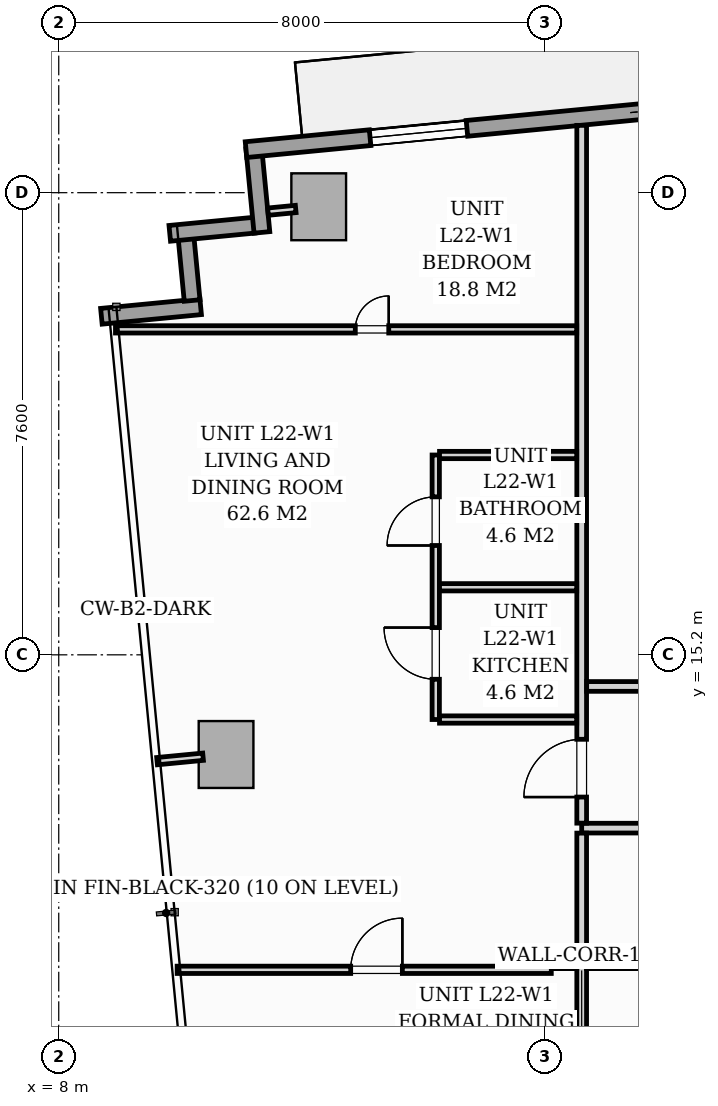
"""IFC4 building model, lengths in metres.
Left out: names, types, materials, properties, quantities, classifications, styles, units other than length and angle.
Written with IfcOpenShell. Run it as: python <this file> out.ifc"""

import sys

from ifc_helpers import new_model, si_unit, direction, frame, frame_2d, origin, origin_2d, place, context, subcontext, project, spatial, rectangle, extrude, source, transform, mapped, element, fill, save


model = new_model("IFC4")
c1 = context("Model", 3, precision=1e-05, world=origin(), true_north=direction((0.0, 1.0)))
c2 = subcontext(c1, "Body", "Model", "MODEL_VIEW")
j1 = project(units=[si_unit("LENGTHUNIT", "METRE"), si_unit("PLANEANGLEUNIT", "RADIAN")], contexts=[c1])
p1 = place(None, origin())
s1 = spatial("IfcSite", under=j1, at=p1, CompositionType="ELEMENT")
p2 = place(p1, origin())
s2 = spatial("IfcBuilding", under=s1, at=p2, CompositionType="ELEMENT")
p3 = place(p2, frame((0.0, 0.0, 81.0)))
s3 = spatial("IfcBuildingStorey", under=s2, at=p3, CompositionType="ELEMENT", Elevation=81.0)
m1 = source(origin(), c2, "Body", "SweptSolid", [
    extrude(rectangle(XDim=0.9, YDim=1.1, at=origin_2d()), origin(), (0.0, 0.0, 1.0), 3.196),
])
for number, where, z_axis, x_axis in (
    (1, (12.275, 22.568, 0.002), (0.0, 0.0, 1.0), (0.995, 0.096, 0.0)),
    (2, (10.752, 13.561, 0.002), (0.0, 0.0, 1.0), (0.995, 0.096, 0.0)),
):
    element("IfcColumn", number, at=place(p3, frame(where, z_axis=z_axis, x_axis=x_axis)), inside=s3, PredefinedType="COLUMN", context=c2, shape_type="MappedRepresentation", body=[
        mapped(m1, transform((0.0, 0.0, 0.0), scale=1.0)),
    ])
p4 = place(p3, frame((8.701, 20.767, 0.0), z_axis=(0.0, 0.0, 1.0), x_axis=(0.995394563142, 0.095862733462, 0.0)))
e3 = element("IfcWall", 3, at=p4, inside=s3, PredefinedType="STANDARD", context=c2, shape_type="SweptSolid", body=[
    extrude(rectangle(XDim=1.64, YDim=0.26, at=frame_2d((0.82, 0.0))), origin(), (0.0, 0.0, 1.0), 2.94),
])
p5 = place(p3, frame((10.193, 21.027, 0.0), z_axis=(0.0, 0.0, 1.0), x_axis=(-0.095740721699, 0.995406306092, 0.0)))
e4 = element("IfcWall", 4, at=p5, inside=s3, PredefinedType="STANDARD", context=c2, shape_type="SweptSolid", body=[
    extrude(rectangle(XDim=1.15, YDim=0.26, at=frame_2d((0.575, 0.0))), origin(), (0.0, 0.0, 1.0), 2.94),
])
p6 = place(p3, frame((9.826, 22.131, 0.0), z_axis=(0.0, 0.0, 1.0), x_axis=(0.995389446633, 0.095915846097, 0.0)))
e5 = element("IfcWall", 5, at=p6, inside=s3, PredefinedType="STANDARD", context=c2, shape_type="SweptSolid", body=[
    extrude(rectangle(XDim=1.395, YDim=0.26, at=frame_2d((0.697, 0.0))), origin(), (0.0, 0.0, 1.0), 2.94),
])
p7 = place(p3, frame((11.341, 22.147, 0.0), z_axis=(0.0, 0.0, 1.0), x_axis=(-0.09589913835, 0.995391056452, 0.0)))
e6 = element("IfcWall", 6, at=p7, inside=s3, PredefinedType="STANDARD", context=c2, shape_type="SweptSolid", body=[
    extrude(rectangle(XDim=1.395, YDim=0.26, at=frame_2d((0.698, 0.0))), origin(), (0.0, 0.0, 1.0), 2.94),
])
p8 = place(p3, frame((11.08, 23.508, 0.0), z_axis=(0.0, 0.0, 1.0), x_axis=(0.995396638587, 0.095841180552, 0.0)))
e7 = element("IfcWall", 7, at=p8, inside=s3, PredefinedType="STANDARD", context=c2, shape_type="SweptSolid", body=[
    extrude(rectangle(XDim=19.11, YDim=0.26, at=frame_2d((9.555, 0.0))), origin(), (0.0, 0.0, 1.0), 2.94),
])
p9 = place(p8, frame((7.159, 0.0, 0.0)))
e8 = element("IfcOpeningElement", 8, at=p9, cuts=e7, PredefinedType="OPENING", context=c2, shape_type="SweptSolid", body=[
    extrude(rectangle(XDim=1.8, YDim=2.06, at=frame_2d((0.9, 1.03))), frame((0.0, 0.14, 0.0), z_axis=(0.0, -1.0, 0.0), x_axis=(1.0, 0.0, 0.0)), (0.0, 0.0, 1.0), 0.28),
])
p10 = place(p8, frame((2.05, 0.0, 0.65)))
e9 = element("IfcOpeningElement", 9, at=p10, cuts=e7, PredefinedType="OPENING", context=c2, shape_type="SweptSolid", body=[
    extrude(rectangle(XDim=1.6, YDim=1.5, at=frame_2d((0.8, 0.75))), frame((0.0, 0.14, 0.0), z_axis=(0.0, -1.0, 0.0), x_axis=(1.0, 0.0, 0.0)), (0.0, 0.0, 1.0), 0.28),
])
p11 = place(p3, frame((16.6, 12.35, 0.0), z_axis=(0.0, 0.0, 1.0), x_axis=(1.0, 0.0, 0.0)))
e10 = element("IfcWall", 10, at=p11, inside=s3, PredefinedType="PARTITIONING", context=c2, shape_type="SweptSolid", body=[
    extrude(rectangle(XDim=37.6, YDim=0.16, at=frame_2d((18.8, 0.0))), origin(), (0.0, 0.0, 1.0), 2.94),
])
p12 = place(p11, frame((2.091, 0.0, 0.0)))
e11 = element("IfcOpeningElement", 11, at=p12, cuts=e10, PredefinedType="OPENING", context=c2, shape_type="SweptSolid", body=[
    extrude(rectangle(XDim=0.95, YDim=2.06, at=frame_2d((0.475, 1.03))), frame((0.0, 0.09, 0.0), z_axis=(0.0, -1.0, 0.0), x_axis=(1.0, 0.0, 0.0)), (0.0, 0.0, 1.0), 0.18),
])
p13 = place(p11, frame((26.146, 0.0, 0.0)))
e12 = element("IfcOpeningElement", 12, at=p13, cuts=e10, PredefinedType="OPENING", context=c2, shape_type="SweptSolid", body=[
    extrude(rectangle(XDim=0.95, YDim=2.06, at=frame_2d((0.475, 1.03))), frame((0.0, 0.09, 0.0), z_axis=(0.0, -1.0, 0.0), x_axis=(1.0, 0.0, 0.0)), (0.0, 0.0, 1.0), 0.18),
])
p14 = place(p3, frame((16.6, 4.341, 0.0), z_axis=(0.0, 0.0, 1.0), x_axis=(0.0, 1.0, 0.0)))
e13 = element("IfcWall", 13, at=p14, inside=s3, PredefinedType="PARTITIONING", context=c2, shape_type="SweptSolid", body=[
    extrude(rectangle(XDim=7.927, YDim=0.16, at=frame_2d((3.964, 0.0))), origin(), (0.0, 0.0, 1.0), 2.94),
])
p15 = place(p3, frame((16.6, 12.432, 0.0), z_axis=(0.0, 0.0, 1.0), x_axis=(0.0, 1.0, 0.0)))
e14 = element("IfcWall", 14, at=p15, inside=s3, PredefinedType="PARTITIONING", context=c2, shape_type="SweptSolid", body=[
    extrude(rectangle(XDim=11.475, YDim=0.16, at=frame_2d((5.738, 0.0))), origin(), (0.0, 0.0, 1.0), 2.94),
])
p16 = place(p15, frame((0.429, 0.0, 0.0)))
e15 = element("IfcOpeningElement", 15, at=p16, cuts=e14, PredefinedType="OPENING", context=c2, shape_type="SweptSolid", body=[
    extrude(rectangle(XDim=0.95, YDim=2.06, at=frame_2d((0.475, 1.03))), frame((0.0, 0.09, 0.0), z_axis=(0.0, -1.0, 0.0), x_axis=(1.0, 0.0, 0.0)), (0.0, 0.0, 1.0), 0.18),
])
p17 = place(p3, frame((16.1, 10.1, 0.0), z_axis=(0.0, 0.0, 1.0), x_axis=(1.0, 0.0, 0.0)))
e16 = element("IfcWall", 16, at=p17, inside=s3, PredefinedType="PARTITIONING", context=c2, shape_type="SweptSolid", body=[
    extrude(rectangle(XDim=0.418, YDim=0.12, at=frame_2d((0.209, 0.0))), origin(), (0.0, 0.0, 1.0), 2.94),
])
p18 = place(p3, frame((16.682, 10.1, 0.0), z_axis=(0.0, 0.0, 1.0), x_axis=(1.0, 0.0, 0.0)))
e17 = element("IfcWall", 17, at=p18, inside=s3, PredefinedType="PARTITIONING", context=c2, shape_type="SweptSolid", body=[
    extrude(rectangle(XDim=2.123, YDim=0.12, at=frame_2d((1.062, 0.0))), origin(), (0.0, 0.0, 1.0), 2.94),
])
p19 = place(p3, frame((14.2, 14.136, 0.0), z_axis=(0.0, 0.0, 1.0), x_axis=(0.0, 1.0, 0.0)))
e18 = element("IfcWall", 18, at=p19, inside=s3, PredefinedType="PARTITIONING", context=c2, shape_type="SweptSolid", body=[
    extrude(rectangle(XDim=4.35, YDim=0.12, at=frame_2d((2.175, 0.0))), origin(), (0.0, 0.0, 1.0), 2.94),
])
p20 = place(p19, frame((0.662, 0.0, 0.0)))
e19 = element("IfcOpeningElement", 19, at=p20, cuts=e18, PredefinedType="OPENING", context=c2, shape_type="SweptSolid", body=[
    extrude(rectangle(XDim=0.85, YDim=2.05, at=frame_2d((0.425, 1.025))), frame((0.0, 0.07, 0.0), z_axis=(0.0, -1.0, 0.0), x_axis=(1.0, 0.0, 0.0)), (0.0, 0.0, 1.0), 0.14),
])
p21 = place(p19, frame((2.862, 0.0, 0.0)))
e20 = element("IfcOpeningElement", 20, at=p21, cuts=e18, PredefinedType="OPENING", context=c2, shape_type="SweptSolid", body=[
    extrude(rectangle(XDim=0.8, YDim=2.02, at=frame_2d((0.4, 1.01))), frame((0.0, 0.07, 0.0), z_axis=(0.0, -1.0, 0.0), x_axis=(1.0, 0.0, 0.0)), (0.0, 0.0, 1.0), 0.14),
])
for number, where, z_axis, x_axis in (
    (21, (14.262, 16.311, 0.0), (0.0, 0.0, 1.0), (1.0, 0.0, 0.0)),
    (22, (14.262, 14.136, 0.0), (0.0, 0.0, 1.0), (1.0, 0.0, 0.0)),
    (23, (14.262, 18.486, 0.0), (0.0, 0.0, 1.0), (1.0, 0.0, 0.0)),
):
    element("IfcWall", number, at=place(p3, frame(where, z_axis=z_axis, x_axis=x_axis)), inside=s3, PredefinedType="PARTITIONING", context=c2, shape_type="SweptSolid", body=[
        extrude(rectangle(XDim=2.256, YDim=0.12, at=frame_2d((1.128, 0.0))), origin(), (0.0, 0.0, 1.0), 2.94),
    ])
p22 = place(p3, frame((8.933, 20.552, 0.0), z_axis=(0.0, 0.0, 1.0), x_axis=(1.0, 0.0, 0.0)))
e24 = element("IfcWall", 24, at=p22, inside=s3, PredefinedType="PARTITIONING", context=c2, shape_type="SweptSolid", body=[
    extrude(rectangle(XDim=7.585, YDim=0.12, at=frame_2d((3.792, 0.0))), origin(), (0.0, 0.0, 1.0), 2.94),
])
p23 = place(p22, frame((3.944, 0.0, 0.0)))
e25 = element("IfcOpeningElement", 25, at=p23, cuts=e24, PredefinedType="OPENING", context=c2, shape_type="SweptSolid", body=[
    extrude(rectangle(XDim=0.55, YDim=2.0, at=frame_2d((0.275, 1.0))), frame((0.0, 0.07, 0.0), z_axis=(0.0, -1.0, 0.0), x_axis=(1.0, 0.0, 0.0)), (0.0, 0.0, 1.0), 0.14),
])
p24 = place(p3, frame((9.947, 10.02, 0.0), z_axis=(0.0, 0.0, 1.0), x_axis=(1.0, 0.0, 0.0)))
e26 = element("IfcWall", 26, at=p24, inside=s3, PredefinedType="PARTITIONING", context=c2, shape_type="SweptSolid", body=[
    extrude(rectangle(XDim=6.153, YDim=0.12, at=frame_2d((3.076, 0.0))), origin(), (0.0, 0.0, 1.0), 2.94),
])
p25 = place(p24, frame((2.854, 0.0, 0.0)))
e27 = element("IfcOpeningElement", 27, at=p25, cuts=e26, PredefinedType="OPENING", context=c2, shape_type="SweptSolid", body=[
    extrude(rectangle(XDim=0.85, YDim=2.05, at=frame_2d((0.425, 1.025))), frame((0.0, 0.07, 0.0), z_axis=(0.0, -1.0, 0.0), x_axis=(1.0, 0.0, 0.0)), (0.0, 0.0, 1.0), 0.14),
])
p26 = place(p3, frame((16.682, 14.68, 0.0), z_axis=(0.0, 0.0, 1.0), x_axis=(1.0, 0.0, 0.0)))
e28 = element("IfcWall", 28, at=p26, inside=s3, PredefinedType="PARTITIONING", context=c2, shape_type="SweptSolid", body=[
    extrude(rectangle(XDim=9.478, YDim=0.16, at=frame_2d((4.739, 0.0))), origin(), (0.0, 0.0, 1.0), 2.94),
])
p27 = place(p26, frame((4.163, 0.0, 0.0)))
e29 = element("IfcOpeningElement", 29, at=p27, cuts=e28, PredefinedType="OPENING", context=c2, shape_type="SweptSolid", body=[
    extrude(rectangle(XDim=0.95, YDim=2.06, at=frame_2d((0.475, 1.03))), frame((0.0, 0.09, 0.0), z_axis=(0.0, -1.0, 0.0), x_axis=(1.0, 0.0, 0.0)), (0.0, 0.0, 1.0), 0.18),
])
p28 = place(p3, frame((11.897, 22.532, 0.0), z_axis=(0.0, 0.0, 1.0), x_axis=(-0.995384576284, -0.09596637586, 0.0)))
e30 = element("IfcWall", 30, at=p28, inside=s3, PredefinedType="PARTITIONING", context=c2, shape_type="SweptSolid", body=[
    extrude(rectangle(XDim=0.458, YDim=0.12, at=frame_2d((0.229, 0.0))), origin(), (0.0, 0.0, 1.0), 2.94),
])
p29 = place(p3, frame((10.373, 13.524, 0.0), z_axis=(0.0, 0.0, 1.0), x_axis=(-0.995377786728, -0.096036772582, 0.0)))
e31 = element("IfcWall", 31, at=p29, inside=s3, PredefinedType="PARTITIONING", context=c2, shape_type="SweptSolid", body=[
    extrude(rectangle(XDim=0.76, YDim=0.12, at=frame_2d((0.38, 0.0))), origin(), (0.0, 0.0, 1.0), 2.94),
])
m2 = source(origin(), c2, "Body", "SweptSolid", [
    extrude(rectangle(XDim=1.6, YDim=1.5, at=frame_2d((0.8, 0.75))), frame((0.0, 0.03, 0.0), z_axis=(0.0, -1.0, 0.0), x_axis=(1.0, 0.0, 0.0)), (0.0, 0.0, 1.0), 0.06),
])
p30 = place(p10, origin())
e32 = element("IfcWindow", 32, at=p30, inside=s3, PartitioningType="SINGLE_PANEL", PredefinedType="WINDOW", context=c2, shape_type="MappedRepresentation", body=[
    mapped(m2, transform((0.0, 0.0, 0.0), scale=1.0)),
])
fill(e9, e32)
m3 = source(origin(), c2, "Body", "SweptSolid", [
    extrude(rectangle(XDim=0.95, YDim=2.06, at=frame_2d((0.475, 1.03))), frame((0.0, 0.025, 0.0), z_axis=(0.0, -1.0, 0.0), x_axis=(1.0, 0.0, 0.0)), (0.0, 0.0, 1.0), 0.05),
])
p31 = place(p16, origin())
e33 = element("IfcDoor", 33, at=p31, inside=s3, OperationType="SINGLE_SWING_LEFT", PredefinedType="DOOR", context=c2, shape_type="MappedRepresentation", body=[
    mapped(m3, transform((0.0, 0.0, 0.0), scale=1.0)),
])
fill(e15, e33)
m4 = source(origin(), c2, "Body", "SweptSolid", [
    extrude(rectangle(XDim=0.85, YDim=2.05, at=frame_2d((0.425, 1.025))), frame((0.0, 0.025, 0.0), z_axis=(0.0, -1.0, 0.0), x_axis=(1.0, 0.0, 0.0)), (0.0, 0.0, 1.0), 0.05),
])
p32 = place(p20, origin())
e34 = element("IfcDoor", 34, at=p32, inside=s3, OperationType="SINGLE_SWING_RIGHT", PredefinedType="DOOR", context=c2, shape_type="MappedRepresentation", body=[
    mapped(m4, transform((0.0, 0.0, 0.0), scale=1.0)),
])
fill(e19, e34)
m5 = source(origin(), c2, "Body", "SweptSolid", [
    extrude(rectangle(XDim=0.8, YDim=2.02, at=frame_2d((0.4, 1.01))), frame((0.0, 0.025, 0.0), z_axis=(0.0, -1.0, 0.0), x_axis=(1.0, 0.0, 0.0)), (0.0, 0.0, 1.0), 0.05),
])
p33 = place(p21, origin())
e35 = element("IfcDoor", 35, at=p33, inside=s3, OperationType="SINGLE_SWING_LEFT", PredefinedType="DOOR", context=c2, shape_type="MappedRepresentation", body=[
    mapped(m5, transform((0.0, 0.0, 0.0), scale=1.0)),
])
fill(e20, e35)
m6 = source(origin(), c2, "Body", "SweptSolid", [
    extrude(rectangle(XDim=0.55, YDim=2.0, at=frame_2d((0.275, 1.0))), frame((0.0, 0.025, 0.0), z_axis=(0.0, -1.0, 0.0), x_axis=(1.0, 0.0, 0.0)), (0.0, 0.0, 1.0), 0.05),
])
p34 = place(p23, origin())
e36 = element("IfcDoor", 36, at=p34, inside=s3, OperationType="SINGLE_SWING_RIGHT", PredefinedType="DOOR", context=c2, shape_type="MappedRepresentation", body=[
    mapped(m6, transform((0.0, 0.0, 0.0), scale=1.0)),
])
fill(e25, e36)
p35 = place(p25, origin())
e37 = element("IfcDoor", 37, at=p35, inside=s3, OperationType="SINGLE_SWING_RIGHT", PredefinedType="DOOR", context=c2, shape_type="MappedRepresentation", body=[
    mapped(m4, transform((0.0, 0.0, 0.0), scale=1.0)),
])
fill(e27, e37)
save(model, sys.argv[1])
